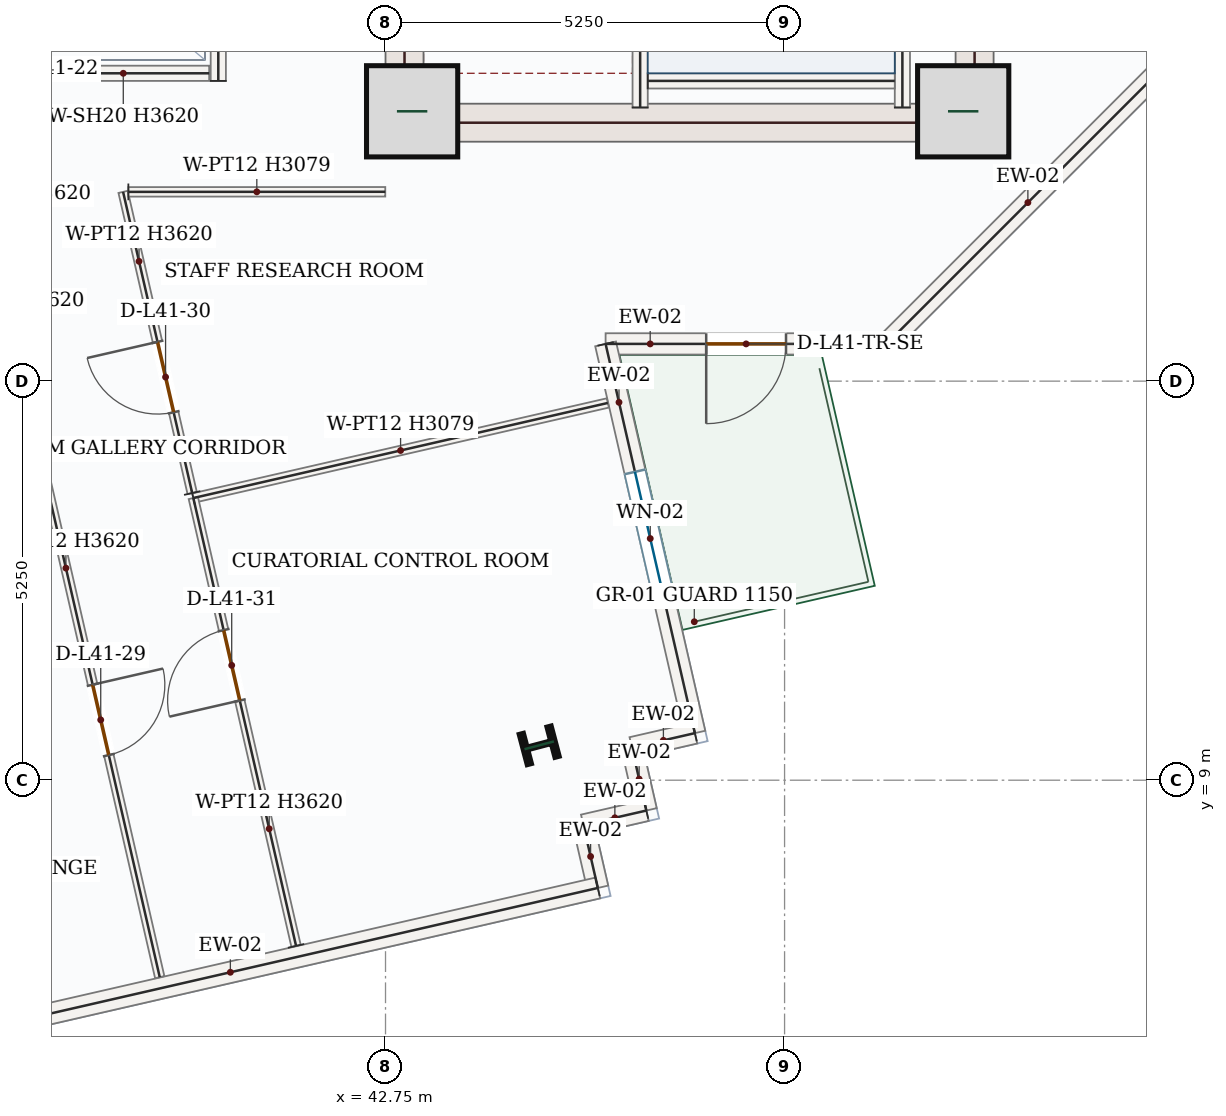
"""IFC4 building model, lengths in metres.
Left out: names, types, materials, properties, quantities, classifications, styles, units other than length and angle.
Written with IfcOpenShell. Run it as: python <this file> out.ifc"""

import sys

from ifc_helpers import new_model, si_unit, direction, frame, frame_2d, origin, origin_2d, place, context, subcontext, project, spatial, rectangle, i_section, extrude, source, transform, mapped, element, fill, save


model = new_model("IFC4")
c1 = context("Model", 3, precision=1e-05, world=origin(), true_north=direction((0.0, 1.0)))
c2 = subcontext(c1, "Body", "Model", "MODEL_VIEW")
j1 = project(units=[si_unit("LENGTHUNIT", "METRE"), si_unit("PLANEANGLEUNIT", "RADIAN")], contexts=[c1])
p1 = place(None, origin())
s1 = spatial("IfcSite", under=j1, at=p1, CompositionType="ELEMENT")
p2 = place(p1, origin())
s2 = spatial("IfcBuilding", under=s1, at=p2, CompositionType="ELEMENT")
p3 = place(p2, frame((0.0, 0.0, 178.5)))
s3 = spatial("IfcBuildingStorey", under=s2, at=p3, CompositionType="ELEMENT", Elevation=178.5)
p4 = place(p3, frame((43.0, 17.4, 0.0), z_axis=(0.0, 0.0, 1.0), x_axis=(0.0, 1.0, 0.0)))
e1 = element("IfcWall", 1, at=p4, inside=s3, PredefinedType="SHEAR", context=c2, shape_type="SweptSolid", body=[
    extrude(rectangle(XDim=8.55, YDim=0.5, at=frame_2d((4.275, 0.0))), origin(), (0.0, 0.0, 1.0), 3.62),
])
p5 = place(p4, frame((6.65, 0.0, 0.0)))
e2 = element("IfcOpeningElement", 2, at=p5, cuts=e1, PredefinedType="OPENING", context=c2, shape_type="SweptSolid", body=[
    extrude(rectangle(XDim=1.1, YDim=2.2, at=frame_2d((0.55, 1.1))), frame((0.0, 0.26, 0.0), z_axis=(0.0, -1.0, 0.0), x_axis=(1.0, 0.0, 0.0)), (0.0, 0.0, 1.0), 0.52),
])
p6 = place(p4, frame((1.75, 0.0, 0.0)))
e3 = element("IfcOpeningElement", 3, at=p6, cuts=e1, PredefinedType="OPENING", context=c2, shape_type="SweptSolid", body=[
    extrude(rectangle(XDim=1.3, YDim=2.2, at=frame_2d((0.65, 1.1))), frame((0.0, 0.26, 0.0), z_axis=(0.0, -1.0, 0.0), x_axis=(1.0, 0.0, 0.0)), (0.0, 0.0, 1.0), 0.52),
])
p7 = place(p4, frame((4.3, 0.0, 0.0)))
e4 = element("IfcOpeningElement", 4, at=p7, cuts=e1, PredefinedType="OPENING", context=c2, shape_type="SweptSolid", body=[
    extrude(rectangle(XDim=0.88, YDim=2.1, at=frame_2d((0.44, 1.05))), frame((0.0, 0.26, 0.0), z_axis=(0.0, -1.0, 0.0), x_axis=(1.0, 0.0, 0.0)), (0.0, 0.0, 1.0), 0.52),
])
m1 = source(origin(), c2, "Body", "SweptSolid", [
    extrude(rectangle(XDim=8.55, YDim=0.5, at=frame_2d((4.275, 0.0))), origin(), (0.0, 0.0, 1.0), 3.62),
])
p8 = place(p3, frame((50.5, 17.4, 0.0), z_axis=(0.0, 0.0, 1.0), x_axis=(0.0, 1.0, 0.0)))
e5 = element("IfcWall", 5, at=p8, inside=s3, PredefinedType="SHEAR", context=c2, shape_type="MappedRepresentation", body=[
    mapped(m1, transform((0.0, 0.0, 0.0), x_axis=(1.0, 0.0, 0.0), y_axis=(0.0, 1.0, 0.0), z_axis=(0.0, 0.0, 1.0), scale=1.0)),
])
m2 = source(origin(), c2, "Body", "SweptSolid", [
    extrude(rectangle(XDim=7.0, YDim=0.5, at=frame_2d((3.5, 0.0))), origin(), (0.0, 0.0, 1.0), 3.62),
])
p9 = place(p3, frame((43.25, 17.65, 0.0), z_axis=(0.0, 0.0, 1.0), x_axis=(1.0, 0.0, 0.0)))
e6 = element("IfcWall", 6, at=p9, inside=s3, PredefinedType="SHEAR", context=c2, shape_type="MappedRepresentation", body=[
    mapped(m2, transform((0.0, 0.0, 0.0), x_axis=(1.0, 0.0, 0.0), y_axis=(0.0, 1.0, 0.0), z_axis=(0.0, 0.0, 1.0), scale=1.0)),
])
m3 = source(origin(), c2, "Body", "SweptSolid", [
    extrude(rectangle(XDim=1.2, YDim=1.2, at=origin_2d()), origin(), (0.0, 0.0, 1.0), 3.9),
])
for number, where, z_axis, x_axis in (
    (7, (43.1, 17.8, 0.0), (0.0, 0.0, 1.0), (1.0, 0.0, 0.0)),
    (8, (50.35, 17.8, 0.0), (0.0, 0.0, 1.0), (1.0, 0.0, 0.0)),
):
    element("IfcColumn", number, at=place(p3, frame(where, z_axis=z_axis, x_axis=x_axis)), inside=s3, PredefinedType="COLUMN", context=c2, shape_type="MappedRepresentation", body=[
        mapped(m3, transform((0.0, 0.0, 0.0), x_axis=(1.0, 0.0, 0.0), y_axis=(0.0, 1.0, 0.0), z_axis=(0.0, 0.0, 1.0), scale=1.0)),
    ])
m4 = source(origin(), c2, "Body", "SweptSolid", [
    extrude(i_section(OverallWidth=0.412, OverallDepth=0.435, WebThickness=0.036, FlangeThickness=0.057, FilletRadius=0.018, at=origin_2d()), origin(), (0.0, 0.0, 1.0), 3.9),
])
p10 = place(p3, frame((44.772, 9.459, 0.0), z_axis=(0.0, 0.0, 1.0), x_axis=(-0.255445757936, 0.966823388604, 0.0)))
e9 = element("IfcColumn", 9, at=p10, inside=s3, PredefinedType="COLUMN", context=c2, shape_type="MappedRepresentation", body=[
    mapped(m4, transform((0.0, 0.0, 0.0), x_axis=(1.0, 0.0, 0.0), y_axis=(0.0, 1.0, 0.0), z_axis=(0.0, 0.0, 1.0), scale=1.0)),
])
m5 = source(origin(), c2, "Body", "SweptSolid", [
    extrude(rectangle(XDim=5.258, YDim=0.28, at=frame_2d((2.629, 0.0))), origin(), (0.0, 0.0, 1.0), 3.62),
])
p11 = place(p3, frame((53.06, 18.458, 0.0), z_axis=(0.0, 0.0, 1.0), x_axis=(-0.707106781187, -0.707106781187, 0.0)))
e10 = element("IfcWall", 10, at=p11, inside=s3, PredefinedType="SOLIDWALL", context=c2, shape_type="MappedRepresentation", body=[
    mapped(m5, transform((0.0, 0.0, 0.0), x_axis=(1.0, 0.0, 0.0), y_axis=(0.0, 1.0, 0.0), z_axis=(0.0, 0.0, 1.0), scale=1.0)),
])
p12 = place(p3, frame((49.342, 14.74, 0.0), z_axis=(0.0, 0.0, 1.0), x_axis=(-1.0, 0.0, 0.0)))
e11 = element("IfcWall", 11, at=p12, inside=s3, PredefinedType="SOLIDWALL", context=c2, shape_type="SweptSolid", body=[
    extrude(rectangle(XDim=3.697, YDim=0.28, at=frame_2d((1.848, 0.0))), origin(), (0.0, 0.0, 1.0), 3.62),
])
p13 = place(p12, frame((1.323, 0.0, 0.0)))
e12 = element("IfcOpeningElement", 12, at=p13, cuts=e11, PredefinedType="OPENING", context=c2, shape_type="SweptSolid", body=[
    extrude(rectangle(XDim=1.05, YDim=2.15, at=frame_2d((0.525, 1.075))), frame((0.0, 0.15, 0.0), z_axis=(0.0, -1.0, 0.0), x_axis=(1.0, 0.0, 0.0)), (0.0, 0.0, 1.0), 0.3),
])
p14 = place(p3, frame((45.646, 14.74, 0.0), z_axis=(0.0, 0.0, 1.0), x_axis=(0.223562871808, -0.974689510741, 0.0)))
e13 = element("IfcWall", 13, at=p14, inside=s3, PredefinedType="SOLIDWALL", context=c2, shape_type="SweptSolid", body=[
    extrude(rectangle(XDim=5.254, YDim=0.28, at=frame_2d((2.627, 0.0))), origin(), (0.0, 0.0, 1.0), 3.62),
])
p15 = place(p14, frame((1.727, 0.0, 0.85)))
e14 = element("IfcOpeningElement", 14, at=p15, cuts=e13, PredefinedType="OPENING", context=c2, shape_type="SweptSolid", body=[
    extrude(rectangle(XDim=1.8, YDim=1.75, at=frame_2d((0.9, 0.875))), frame((0.0, 0.15, 0.0), z_axis=(0.0, -1.0, 0.0), x_axis=(1.0, 0.0, 0.0)), (0.0, 0.0, 1.0), 0.3),
])
m6 = source(origin(), c2, "Body", "SweptSolid", [
    extrude(rectangle(XDim=0.85, YDim=0.28, at=frame_2d((0.425, 0.0))), origin(), (0.0, 0.0, 1.0), 3.62),
])
p16 = place(p3, frame((46.82, 9.619, 0.0), z_axis=(0.0, 0.0, 1.0), x_axis=(-0.974704946586, -0.223495563939, 0.0)))
e15 = element("IfcWall", 15, at=p16, inside=s3, PredefinedType="SOLIDWALL", context=c2, shape_type="MappedRepresentation", body=[
    mapped(m6, transform((0.0, 0.0, 0.0), x_axis=(1.0, 0.0, 0.0), y_axis=(0.0, 1.0, 0.0), z_axis=(0.0, 0.0, 1.0), scale=1.0)),
])
m7 = source(origin(), c2, "Body", "SweptSolid", [
    extrude(rectangle(XDim=0.85, YDim=0.28, at=frame_2d((0.425, 0.0))), origin(), (0.0, 0.0, 1.0), 3.62),
])
for number, where, z_axis, x_axis in (
    (16, (45.992, 9.429, 0.0), (0.0, 0.0, 1.0), (0.223, -0.975, 0.0)),
    (17, (46.182, 8.601, 0.0), (0.0, 0.0, 1.0), (-0.975, -0.223, 0.0)),
):
    element("IfcWall", number, at=place(p3, frame(where, z_axis=z_axis, x_axis=x_axis)), inside=s3, PredefinedType="SOLIDWALL", context=c2, shape_type="MappedRepresentation", body=[
        mapped(m7, transform((0.0, 0.0, 0.0), x_axis=(1.0, 0.0, 0.0), y_axis=(0.0, 1.0, 0.0), z_axis=(0.0, 0.0, 1.0), scale=1.0)),
    ])
p17 = place(p3, frame((45.353, 8.411, 0.0), z_axis=(0.0, 0.0, 1.0), x_axis=(0.223768457828, -0.974642333003, 0.0)))
e18 = element("IfcWall", 18, at=p17, inside=s3, PredefinedType="SOLIDWALL", context=c2, shape_type="MappedRepresentation", body=[
    mapped(m6, transform((0.0, 0.0, 0.0), x_axis=(1.0, 0.0, 0.0), y_axis=(0.0, 1.0, 0.0), z_axis=(0.0, 0.0, 1.0), scale=1.0)),
])
m8 = source(origin(), c2, "Body", "SweptSolid", [
    extrude(rectangle(XDim=9.92, YDim=0.28, at=frame_2d((4.96, 0.0))), origin(), (0.0, 0.0, 1.0), 3.62),
])
p18 = place(p3, frame((45.543, 7.582, 0.0), z_axis=(0.0, 0.0, 1.0), x_axis=(-0.974682391567, -0.223593907719, 0.0)))
e19 = element("IfcWall", 19, at=p18, inside=s3, PredefinedType="SOLIDWALL", context=c2, shape_type="MappedRepresentation", body=[
    mapped(m8, transform((0.0, 0.0, 0.0), x_axis=(1.0, 0.0, 0.0), y_axis=(0.0, 1.0, 0.0), z_axis=(0.0, 0.0, 1.0), scale=1.0)),
])
m9 = source(origin(), c2, "Body", "SweptSolid", [
    extrude(rectangle(XDim=7.87, YDim=0.2, at=frame_2d((3.935, 0.0))), origin(), (0.0, 0.0, 1.0), 3.62),
])
p19 = place(p3, frame((49.55, 17.85, 0.0), z_axis=(0.0, 0.0, 1.0), x_axis=(0.0, 1.0, 0.0)))
e20 = element("IfcWall", 20, at=p19, inside=s3, PredefinedType="SOLIDWALL", context=c2, shape_type="MappedRepresentation", body=[
    mapped(m9, transform((0.0, 0.0, 0.0), x_axis=(1.0, 0.0, 0.0), y_axis=(0.0, 1.0, 0.0), z_axis=(0.0, 0.0, 1.0), scale=1.0)),
])
p20 = place(p3, frame((46.1, 17.85, 0.0), z_axis=(0.0, 0.0, 1.0), x_axis=(0.0, 1.0, 0.0)))
e21 = element("IfcWall", 21, at=p20, inside=s3, PredefinedType="SOLIDWALL", context=c2, shape_type="SweptSolid", body=[
    extrude(rectangle(XDim=8.0, YDim=0.2, at=frame_2d((4.0, 0.0))), origin(), (0.0, 0.0, 1.0), 3.62),
])
p21 = place(p20, frame((6.3, 0.0, 0.0)))
e22 = element("IfcOpeningElement", 22, at=p21, cuts=e21, PredefinedType="OPENING", context=c2, shape_type="SweptSolid", body=[
    extrude(rectangle(XDim=1.05, YDim=2.15, at=frame_2d((0.525, 1.075))), frame((0.0, 0.11, 0.0), z_axis=(0.0, -1.0, 0.0), x_axis=(1.0, 0.0, 0.0)), (0.0, 0.0, 1.0), 0.22),
])
m10 = source(origin(), c2, "Body", "SweptSolid", [
    extrude(rectangle(XDim=3.25, YDim=0.2, at=frame_2d((1.625, 0.0))), origin(), (0.0, 0.0, 1.0), 3.62),
])
p22 = place(p3, frame((46.2, 18.2, 0.0), z_axis=(0.0, 0.0, 1.0), x_axis=(1.0, 0.0, 0.0)))
e23 = element("IfcWall", 23, at=p22, inside=s3, PredefinedType="SOLIDWALL", context=c2, shape_type="MappedRepresentation", body=[
    mapped(m10, transform((0.0, 0.0, 0.0), x_axis=(1.0, 0.0, 0.0), y_axis=(0.0, 1.0, 0.0), z_axis=(0.0, 0.0, 1.0), scale=1.0)),
])
p23 = place(p3, frame((40.55, 18.2, 0.0), z_axis=(0.0, 0.0, 1.0), x_axis=(0.0, 1.0, 0.0)))
e24 = element("IfcWall", 24, at=p23, inside=s3, PredefinedType="SOLIDWALL", context=c2, shape_type="SweptSolid", body=[
    extrude(rectangle(XDim=2.35, YDim=0.2, at=frame_2d((1.175, 0.0))), origin(), (0.0, 0.0, 1.0), 3.62),
])
p24 = place(p23, frame((0.625, 0.0, 0.0)))
e25 = element("IfcOpeningElement", 25, at=p24, cuts=e24, PredefinedType="OPENING", context=c2, shape_type="SweptSolid", body=[
    extrude(rectangle(XDim=1.1, YDim=2.15, at=frame_2d((0.55, 1.075))), frame((0.0, 0.11, 0.0), z_axis=(0.0, -1.0, 0.0), x_axis=(1.0, 0.0, 0.0)), (0.0, 0.0, 1.0), 0.22),
])
m11 = source(origin(), c2, "Body", "SweptSolid", [
    extrude(rectangle(XDim=2.26, YDim=0.2, at=frame_2d((1.13, 0.0))), origin(), (0.0, 0.0, 1.0), 3.62),
])
p25 = place(p3, frame((38.17, 18.3, 0.0), z_axis=(0.0, 0.0, 1.0), x_axis=(1.0, 0.0, 0.0)))
e26 = element("IfcWall", 26, at=p25, inside=s3, PredefinedType="SOLIDWALL", context=c2, shape_type="MappedRepresentation", body=[
    mapped(m11, transform((0.0, 0.0, 0.0), x_axis=(1.0, 0.0, 0.0), y_axis=(0.0, 1.0, 0.0), z_axis=(0.0, 0.0, 1.0), scale=1.0)),
])
m12 = source(origin(), c2, "Body", "SweptSolid", [
    extrude(rectangle(XDim=5.595, YDim=0.125, at=frame_2d((2.797, 0.0))), origin(), (0.0, 0.0, 1.0), 3.079),
])
p26 = place(p3, frame((40.221, 12.712, 0.0), z_axis=(0.0, 0.0, 1.0), x_axis=(0.974683801791, 0.223587760235, 0.0)))
e27 = element("IfcWall", 27, at=p26, inside=s3, PredefinedType="PARTITIONING", context=c2, shape_type="MappedRepresentation", body=[
    mapped(m12, transform((0.0, 0.0, 0.0), x_axis=(1.0, 0.0, 0.0), y_axis=(0.0, 1.0, 0.0), z_axis=(0.0, 0.0, 1.0), scale=1.0)),
])
p27 = place(p3, frame((41.573, 6.82, 0.0), z_axis=(0.0, 0.0, 1.0), x_axis=(-0.223588000718, 0.974683746625, 0.0)))
e28 = element("IfcWall", 28, at=p27, inside=s3, PredefinedType="PARTITIONING", context=c2, shape_type="SweptSolid", body=[
    extrude(rectangle(XDim=6.045, YDim=0.125, at=frame_2d((3.022, 0.0))), origin(), (0.0, 0.0, 1.0), 3.62),
])
p28 = place(p27, frame((3.312, 0.0, 0.0)))
e29 = element("IfcOpeningElement", 29, at=p28, cuts=e28, PredefinedType="OPENING", context=c2, shape_type="SweptSolid", body=[
    extrude(rectangle(XDim=0.95, YDim=2.15, at=frame_2d((0.475, 1.075))), frame((0.0, 0.073, 0.0), z_axis=(0.0, -1.0, 0.0), x_axis=(1.0, 0.0, 0.0)), (0.0, 0.0, 1.0), 0.145),
])
p29 = place(p3, frame((40.206, 12.778, 0.0), z_axis=(0.0, 0.0, 1.0), x_axis=(-0.223552104445, 0.97469198037, 0.0)))
e30 = element("IfcWall", 30, at=p29, inside=s3, PredefinedType="PARTITIONING", context=c2, shape_type="SweptSolid", body=[
    extrude(rectangle(XDim=4.065, YDim=0.125, at=frame_2d((2.032, 0.0))), origin(), (0.0, 0.0, 1.0), 3.62),
])
p30 = place(p29, frame((1.09, 0.0, 0.0)))
e31 = element("IfcOpeningElement", 31, at=p30, cuts=e30, PredefinedType="OPENING", context=c2, shape_type="SweptSolid", body=[
    extrude(rectangle(XDim=0.95, YDim=2.15, at=frame_2d((0.475, 1.075))), frame((0.0, 0.073, 0.0), z_axis=(0.0, -1.0, 0.0), x_axis=(1.0, 0.0, 0.0)), (0.0, 0.0, 1.0), 0.145),
])
m13 = source(origin(), c2, "Body", "SweptSolid", [
    extrude(rectangle(XDim=3.38, YDim=0.125, at=frame_2d((1.69, 0.0))), origin(), (0.0, 0.0, 1.0), 3.079),
])
p31 = place(p3, frame((39.367, 16.74, 0.0), z_axis=(0.0, 0.0, 1.0), x_axis=(0.999999934779, 0.000361167269, 0.0)))
e32 = element("IfcWall", 32, at=p31, inside=s3, PredefinedType="PARTITIONING", context=c2, shape_type="MappedRepresentation", body=[
    mapped(m13, transform((0.0, 0.0, 0.0), x_axis=(1.0, 0.0, 0.0), y_axis=(0.0, 1.0, 0.0), z_axis=(0.0, 0.0, 1.0), scale=1.0)),
])
p32 = place(p3, frame((38.227, 13.178, 0.0), z_axis=(0.0, 0.0, 1.0), x_axis=(0.223573066544, -0.974687172336, 0.0)))
e33 = element("IfcWall", 33, at=p32, inside=s3, PredefinedType="PARTITIONING", context=c2, shape_type="SweptSolid", body=[
    extrude(rectangle(XDim=6.945, YDim=0.125, at=frame_2d((3.473, 0.0))), origin(), (0.0, 0.0, 1.0), 3.62),
])
p33 = place(p32, frame((2.998, 0.0, 0.0)))
e34 = element("IfcOpeningElement", 34, at=p33, cuts=e33, PredefinedType="OPENING", context=c2, shape_type="SweptSolid", body=[
    extrude(rectangle(XDim=0.95, YDim=2.15, at=frame_2d((0.475, 1.075))), frame((0.0, 0.073, 0.0), z_axis=(0.0, -1.0, 0.0), x_axis=(1.0, 0.0, 0.0)), (0.0, 0.0, 1.0), 0.145),
])
m14 = source(origin(), c2, "Body", "SweptSolid", [
    extrude(rectangle(XDim=1.05, YDim=2.15, at=frame_2d((0.525, 1.075))), frame((0.0, 0.025, 0.0), z_axis=(0.0, -1.0, 0.0), x_axis=(1.0, 0.0, 0.0)), (0.0, 0.0, 1.0), 0.05),
])
p34 = place(p13, origin())
e35 = element("IfcDoor", 35, at=p34, inside=s3, OperationType="SINGLE_SWING_RIGHT", PredefinedType="DOOR", context=c2, shape_type="MappedRepresentation", body=[
    mapped(m14, transform((0.0, 0.0, 0.0), x_axis=(1.0, 0.0, 0.0), y_axis=(0.0, 1.0, 0.0), z_axis=(0.0, 0.0, 1.0), scale=1.0)),
])
fill(e12, e35)
m15 = source(origin(), c2, "Body", "SweptSolid", [
    extrude(rectangle(XDim=1.8, YDim=1.75, at=frame_2d((0.9, 0.875))), frame((0.0, 0.03, 0.0), z_axis=(0.0, -1.0, 0.0), x_axis=(1.0, 0.0, 0.0)), (0.0, 0.0, 1.0), 0.06),
])
p35 = place(p15, origin())
e36 = element("IfcWindow", 36, at=p35, inside=s3, PartitioningType="DOUBLE_PANEL_VERTICAL", PredefinedType="WINDOW", context=c2, shape_type="MappedRepresentation", body=[
    mapped(m15, transform((0.0, 0.0, 0.0), x_axis=(1.0, 0.0, 0.0), y_axis=(0.0, 1.0, 0.0), z_axis=(0.0, 0.0, 1.0), scale=1.0)),
])
fill(e14, e36)
m16 = source(origin(), c2, "Body", "SweptSolid", [
    extrude(rectangle(XDim=0.95, YDim=2.15, at=frame_2d((0.475, 1.075))), frame((0.0, 0.025, 0.0), z_axis=(0.0, -1.0, 0.0), x_axis=(1.0, 0.0, 0.0)), (0.0, 0.0, 1.0), 0.05),
])
p36 = place(p33, origin())
e37 = element("IfcDoor", 37, at=p36, inside=s3, OperationType="SINGLE_SWING_LEFT", PredefinedType="DOOR", context=c2, shape_type="MappedRepresentation", body=[
    mapped(m16, transform((0.0, 0.0, 0.0), x_axis=(1.0, 0.0, 0.0), y_axis=(0.0, 1.0, 0.0), z_axis=(0.0, 0.0, 1.0), scale=1.0)),
])
fill(e34, e37)
p37 = place(p30, origin())
e38 = element("IfcDoor", 38, at=p37, inside=s3, OperationType="SINGLE_SWING_RIGHT", PredefinedType="DOOR", context=c2, shape_type="MappedRepresentation", body=[
    mapped(m16, transform((0.0, 0.0, 0.0), x_axis=(1.0, 0.0, 0.0), y_axis=(0.0, 1.0, 0.0), z_axis=(0.0, 0.0, 1.0), scale=1.0)),
])
fill(e31, e38)
p38 = place(p28, origin())
e39 = element("IfcDoor", 39, at=p38, inside=s3, OperationType="SINGLE_SWING_LEFT", PredefinedType="DOOR", context=c2, shape_type="MappedRepresentation", body=[
    mapped(m16, transform((0.0, 0.0, 0.0), x_axis=(1.0, 0.0, 0.0), y_axis=(0.0, 1.0, 0.0), z_axis=(0.0, 0.0, 1.0), scale=1.0)),
])
fill(e29, e39)
save(model, sys.argv[1])
